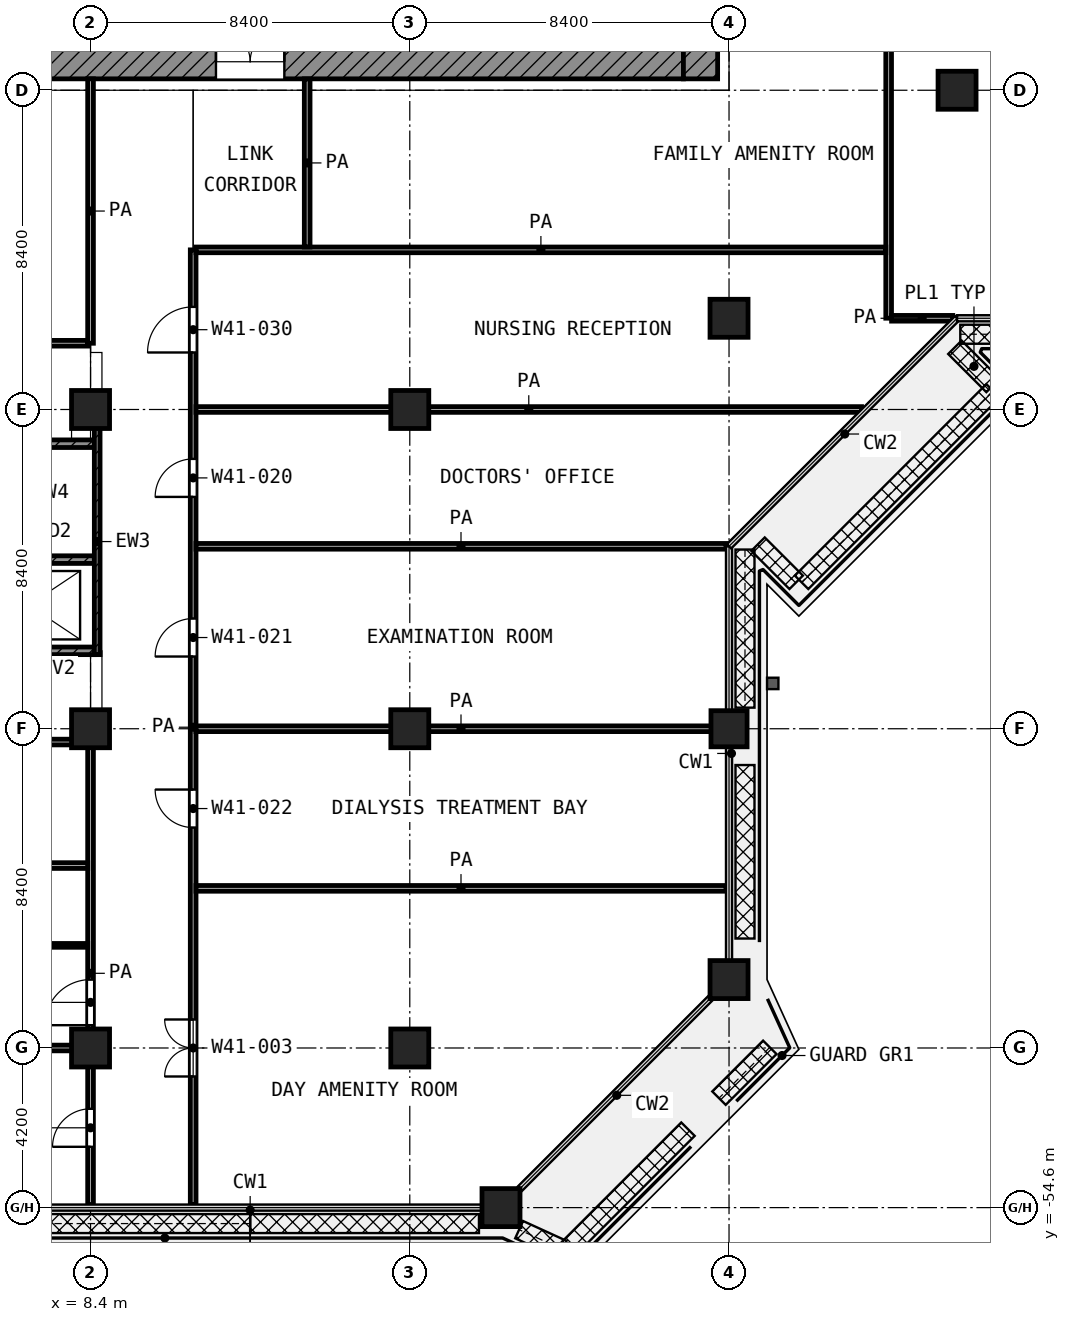
"""IFC4 building model, lengths in metres.
Left out: names, types, materials, properties, quantities, classifications, styles, units other than length and angle.
Written with IfcOpenShell. Run it as: python <this file> out.ifc"""

import sys

from ifc_helpers import new_model, si_unit, direction, frame, frame_2d, origin, origin_2d, place, context, subcontext, project, spatial, rectangle, extrude, element, fill, save


model = new_model("IFC4")
c1 = context("Model", 3, precision=1e-05, world=origin(), true_north=direction((0.0, 1.0)))
c2 = subcontext(c1, "Body", "Model", "MODEL_VIEW")
j1 = project(units=[si_unit("LENGTHUNIT", "METRE"), si_unit("PLANEANGLEUNIT", "RADIAN")], contexts=[c1])
p1 = place(None, origin())
s1 = spatial("IfcSite", under=j1, at=p1, CompositionType="ELEMENT")
p2 = place(p1, origin())
s2 = spatial("IfcBuilding", under=s1, at=p2, CompositionType="ELEMENT")
p3 = place(p2, frame((0.0, 0.0, 179.4)))
s3 = spatial("IfcBuildingStorey", under=s2, at=p3, CompositionType="ELEMENT", Elevation=179.4)
for number, where, z_axis, x_axis in (
    (1, (31.2, -25.2, 0.0), (0.0, 0.0, 1.0), (1.0, 0.0, 0.0)),
    (2, (25.2, -31.2, 0.0), (0.0, 0.0, 1.0), (1.0, 0.0, 0.0)),
    (3, (8.4, -33.6, 0.0), (0.0, 0.0, 1.0), (1.0, 0.0, 0.0)),
    (4, (16.8, -33.6, 0.0), (0.0, 0.0, 1.0), (1.0, 0.0, 0.0)),
    (5, (8.4, -42.0, 0.0), (0.0, 0.0, 1.0), (1.0, 0.0, 0.0)),
    (6, (16.8, -42.0, 0.0), (0.0, 0.0, 1.0), (1.0, 0.0, 0.0)),
):
    element("IfcColumn", number, at=place(p3, frame(where, z_axis=z_axis, x_axis=x_axis)), inside=s3, PredefinedType="COLUMN", context=c2, shape_type="SweptSolid", body=[
        extrude(rectangle(XDim=1.0, YDim=1.0, at=origin_2d()), origin(), (0.0, 0.0, 1.0), 4.2),
    ])
p4 = place(p3, frame((25.2, -42.0, 0.0), z_axis=(0.0, 0.0, 1.0), x_axis=(1.0, 0.0, 0.0)))
e7 = element("IfcColumn", 7, at=p4, inside=s3, PredefinedType="COLUMN", context=c2, shape_type="SweptSolid", body=[
    extrude(rectangle(XDim=0.95, YDim=0.95, at=origin_2d()), origin(), (0.0, 0.0, 1.0), 4.2),
])
for number, where, z_axis, x_axis in (
    (8, (25.2, -48.6, 0.0), (0.0, 0.0, 1.0), (1.0, 0.0, 0.0)),
    (9, (8.4, -50.4, 0.0), (0.0, 0.0, 1.0), (1.0, 0.0, 0.0)),
    (10, (16.8, -50.4, 0.0), (0.0, 0.0, 1.0), (1.0, 0.0, 0.0)),
    (11, (19.2, -54.6, 0.0), (0.0, 0.0, 1.0), (1.0, 0.0, 0.0)),
):
    element("IfcColumn", number, at=place(p3, frame(where, z_axis=z_axis, x_axis=x_axis)), inside=s3, PredefinedType="COLUMN", context=c2, shape_type="SweptSolid", body=[
        extrude(rectangle(XDim=1.0, YDim=1.0, at=origin_2d()), origin(), (0.0, 0.0, 1.0), 4.2),
    ])
p5 = place(p3, frame((5.4, -24.45, 0.0), z_axis=(0.0, 0.0, 1.0), x_axis=(1.0, 0.0, 0.0)))
e12 = element("IfcWall", 12, at=p5, inside=s3, PredefinedType="SHEAR", context=c2, shape_type="SweptSolid", body=[
    extrude(rectangle(XDim=18.6, YDim=0.9, at=frame_2d((9.3, 0.0))), origin(), (0.0, 0.0, 1.0), 3.6),
])
p6 = place(p5, frame((6.3, 0.0, 0.0)))
e13 = element("IfcOpeningElement", 13, at=p6, cuts=e12, PredefinedType="OPENING", context=c2, shape_type="SweptSolid", body=[
    extrude(rectangle(XDim=1.8, YDim=2.1, at=frame_2d((0.9, 1.05))), frame((0.0, 0.46, 0.0), z_axis=(0.0, -1.0, 0.0), x_axis=(1.0, 0.0, 0.0)), (0.0, 0.0, 1.0), 0.92),
])
p7 = place(p3, frame((24.45, -24.9, 0.0), z_axis=(0.0, 0.0, 1.0), x_axis=(0.0, 1.0, 0.0)))
e14 = element("IfcWall", 14, at=p7, inside=s3, PredefinedType="SHEAR", context=c2, shape_type="SweptSolid", body=[
    extrude(rectangle(XDim=0.9, YDim=0.9, at=frame_2d((0.45, 0.0))), origin(), (0.0, 0.0, 1.0), 3.6),
])
p8 = place(p3, frame((8.575, -40.05, 0.0), z_axis=(0.0, 0.0, 1.0), x_axis=(0.0, 1.0, 0.0)))
e15 = element("IfcWall", 15, at=p8, inside=s3, PredefinedType="SHEAR", context=c2, shape_type="SweptSolid", body=[
    extrude(rectangle(XDim=5.95, YDim=0.15, at=frame_2d((2.975, 0.0))), origin(), (0.0, 0.0, 1.0), 3.6),
])
p9 = place(p3, frame((0.45, -34.5, 0.0), z_axis=(0.0, 0.0, 1.0), x_axis=(1.0, 0.0, 0.0)))
e16 = element("IfcWall", 16, at=p9, inside=s3, PredefinedType="SHEAR", context=c2, shape_type="SweptSolid", body=[
    extrude(rectangle(XDim=8.05, YDim=0.2, at=frame_2d((4.025, 0.0))), origin(), (0.0, 0.0, 1.0), 3.6),
])
p10 = place(p9, frame((0.75, 0.0, 0.0)))
e17 = element("IfcOpeningElement", 17, at=p10, cuts=e16, PredefinedType="OPENING", context=c2, shape_type="SweptSolid", body=[
    extrude(rectangle(XDim=1.1, YDim=2.1, at=frame_2d((0.55, 1.05))), frame((0.0, 0.11, 0.0), z_axis=(0.0, -1.0, 0.0), x_axis=(1.0, 0.0, 0.0)), (0.0, 0.0, 1.0), 0.22),
])
p11 = place(p3, frame((0.45, -37.55, 0.0), z_axis=(0.0, 0.0, 1.0), x_axis=(1.0, 0.0, 0.0)))
e18 = element("IfcWall", 18, at=p11, inside=s3, PredefinedType="SHEAR", context=c2, shape_type="SweptSolid", body=[
    extrude(rectangle(XDim=8.05, YDim=0.2, at=frame_2d((4.025, 0.0))), origin(), (0.0, 0.0, 1.0), 3.6),
])
p12 = place(p11, frame((0.1, 0.0, 0.0)))
e19 = element("IfcOpeningElement", 19, at=p12, cuts=e18, PredefinedType="OPENING", context=c2, shape_type="SweptSolid", body=[
    extrude(rectangle(XDim=1.1, YDim=2.1, at=frame_2d((0.55, 1.05))), frame((0.0, 0.11, 0.0), z_axis=(0.0, -1.0, 0.0), x_axis=(1.0, 0.0, 0.0)), (0.0, 0.0, 1.0), 0.22),
])
p13 = place(p3, frame((0.45, -39.95, 0.0), z_axis=(0.0, 0.0, 1.0), x_axis=(1.0, 0.0, 0.0)))
e20 = element("IfcWall", 20, at=p13, inside=s3, PredefinedType="SHEAR", context=c2, shape_type="SweptSolid", body=[
    extrude(rectangle(XDim=8.05, YDim=0.2, at=frame_2d((4.025, 0.0))), origin(), (0.0, 0.0, 1.0), 3.6),
])
p14 = place(p13, frame((2.0, 0.0, 0.0)))
e21 = element("IfcOpeningElement", 21, at=p14, cuts=e20, PredefinedType="OPENING", context=c2, shape_type="SweptSolid", body=[
    extrude(rectangle(XDim=1.1, YDim=2.1, at=frame_2d((0.55, 1.05))), frame((0.0, 0.11, 0.0), z_axis=(0.0, -1.0, 0.0), x_axis=(1.0, 0.0, 0.0)), (0.0, 0.0, 1.0), 0.22),
])
p15 = place(p3, frame((5.75, -47.7, 0.0), z_axis=(0.0, 0.0, 1.0), x_axis=(1.0, 0.0, 0.0)))
e22 = element("IfcWall", 22, at=p15, inside=s3, PredefinedType="PARTITIONING", context=c2, shape_type="SweptSolid", body=[
    extrude(rectangle(XDim=2.575, YDim=0.1, at=frame_2d((1.288, 0.0))), origin(), (0.0, 0.0, 1.0), 3.6),
])
p16 = place(p3, frame((1.913, -50.4, 0.0), z_axis=(0.0, 0.0, 1.0), x_axis=(1.0, 0.0, 0.0)))
e23 = element("IfcWall", 23, at=p16, inside=s3, PredefinedType="PARTITIONING", context=c2, shape_type="SweptSolid", body=[
    extrude(rectangle(XDim=6.412, YDim=0.15, at=frame_2d((3.206, 0.0))), origin(), (0.0, 0.0, 1.0), 3.6),
])
p17 = place(p3, frame((11.175, -46.2, 0.0), z_axis=(0.0, 0.0, 1.0), x_axis=(1.0, 0.0, 0.0)))
e24 = element("IfcWall", 24, at=p17, inside=s3, PredefinedType="PARTITIONING", context=c2, shape_type="SweptSolid", body=[
    extrude(rectangle(XDim=13.945, YDim=0.15, at=frame_2d((6.973, 0.0))), origin(), (0.0, 0.0, 1.0), 3.6),
])
p18 = place(p3, frame((0.08, -45.6, 0.0), z_axis=(0.0, 0.0, 1.0), x_axis=(1.0, 0.0, 0.0)))
e25 = element("IfcWall", 25, at=p18, inside=s3, PredefinedType="PARTITIONING", context=c2, shape_type="SweptSolid", body=[
    extrude(rectangle(XDim=8.245, YDim=0.15, at=frame_2d((4.123, 0.0))), origin(), (0.0, 0.0, 1.0), 3.6),
])
p19 = place(p3, frame((2.327, -42.35, 0.0), z_axis=(0.0, 0.0, 1.0), x_axis=(1.0, 0.0, 0.0)))
e26 = element("IfcWall", 26, at=p19, inside=s3, PredefinedType="PARTITIONING", context=c2, shape_type="SweptSolid", body=[
    extrude(rectangle(XDim=5.998, YDim=0.15, at=frame_2d((2.999, 0.0))), origin(), (0.0, 0.0, 1.0), 3.6),
])
p20 = place(p19, frame((2.499, 0.0, 0.0)))
e27 = element("IfcOpeningElement", 27, at=p20, cuts=e26, PredefinedType="OPENING", context=c2, shape_type="SweptSolid", body=[
    extrude(rectangle(XDim=1.0, YDim=2.1, at=frame_2d((0.5, 1.05))), frame((0.0, 0.085, 0.0), z_axis=(0.0, -1.0, 0.0), x_axis=(1.0, 0.0, 0.0)), (0.0, 0.0, 1.0), 0.17),
])
for number, where, z_axis, x_axis in (
    (28, (11.175, -42.0, 0.0), (0.0, 0.0, 1.0), (1.0, 0.0, 0.0)),
    (29, (11.175, -37.2, 0.0), (0.0, 0.0, 1.0), (1.0, 0.0, 0.0)),
):
    element("IfcWall", number, at=place(p3, frame(where, z_axis=z_axis, x_axis=x_axis)), inside=s3, PredefinedType="PARTITIONING", context=c2, shape_type="SweptSolid", body=[
        extrude(rectangle(XDim=13.945, YDim=0.15, at=frame_2d((6.973, 0.0))), origin(), (0.0, 0.0, 1.0), 3.6),
    ])
p21 = place(p3, frame((11.175, -33.6, 0.0), z_axis=(0.0, 0.0, 1.0), x_axis=(1.0, 0.0, 0.0)))
e30 = element("IfcWall", 30, at=p21, inside=s3, PredefinedType="PARTITIONING", context=c2, shape_type="SweptSolid", body=[
    extrude(rectangle(XDim=17.512, YDim=0.15, at=frame_2d((8.756, 0.0))), origin(), (0.0, 0.0, 1.0), 3.6),
])
p22 = place(p3, frame((1.077, -31.857, 0.0), z_axis=(0.0, 0.0, 1.0), x_axis=(1.0, 0.0, 0.0)))
e31 = element("IfcWall", 31, at=p22, inside=s3, PredefinedType="PARTITIONING", context=c2, shape_type="SweptSolid", body=[
    extrude(rectangle(XDim=7.248, YDim=0.15, at=frame_2d((3.624, 0.0))), origin(), (0.0, 0.0, 1.0), 3.6),
])
p23 = place(p22, frame((3.024, 0.0, 0.0)))
e32 = element("IfcOpeningElement", 32, at=p23, cuts=e31, PredefinedType="OPENING", context=c2, shape_type="SweptSolid", body=[
    extrude(rectangle(XDim=1.2, YDim=2.1, at=frame_2d((0.6, 1.05))), frame((0.0, 0.085, 0.0), z_axis=(0.0, -1.0, 0.0), x_axis=(1.0, 0.0, 0.0)), (0.0, 0.0, 1.0), 0.17),
])
p24 = place(p3, frame((29.477, -31.2, 0.0), z_axis=(0.0, 0.0, 1.0), x_axis=(1.0, 0.0, 0.0)))
e33 = element("IfcWall", 33, at=p24, inside=s3, PredefinedType="PARTITIONING", context=c2, shape_type="SweptSolid", body=[
    extrude(rectangle(XDim=1.61, YDim=0.15, at=frame_2d((0.805, 0.0))), origin(), (0.0, 0.0, 1.0), 3.6),
])
p25 = place(p3, frame((11.175, -29.4, 0.0), z_axis=(0.0, 0.0, 1.0), x_axis=(1.0, 0.0, 0.0)))
e34 = element("IfcWall", 34, at=p25, inside=s3, PredefinedType="PARTITIONING", context=c2, shape_type="SweptSolid", body=[
    extrude(rectangle(XDim=18.15, YDim=0.15, at=frame_2d((9.075, 0.0))), origin(), (0.0, 0.0, 1.0), 3.6),
])
p26 = place(p3, frame((8.4, -54.52, 0.0), z_axis=(0.0, 0.0, 1.0), x_axis=(0.0, 1.0, 0.0)))
e35 = element("IfcWall", 35, at=p26, inside=s3, PredefinedType="PARTITIONING", context=c2, shape_type="SweptSolid", body=[
    extrude(rectangle(XDim=12.17, YDim=0.15, at=frame_2d((6.085, 0.0))), origin(), (0.0, 0.0, 1.0), 3.6),
])
p27 = place(p26, frame((4.72, 0.0, 0.0)))
e36 = element("IfcOpeningElement", 36, at=p27, cuts=e35, PredefinedType="OPENING", context=c2, shape_type="SweptSolid", body=[
    extrude(rectangle(XDim=1.2, YDim=2.1, at=frame_2d((0.6, 1.05))), frame((0.0, 0.085, 0.0), z_axis=(0.0, -1.0, 0.0), x_axis=(1.0, 0.0, 0.0)), (0.0, 0.0, 1.0), 0.17),
])
p28 = place(p26, frame((1.52, 0.0, 0.0)))
e37 = element("IfcOpeningElement", 37, at=p28, cuts=e35, PredefinedType="OPENING", context=c2, shape_type="SweptSolid", body=[
    extrude(rectangle(XDim=1.0, YDim=2.1, at=frame_2d((0.5, 1.05))), frame((0.0, 0.085, 0.0), z_axis=(0.0, -1.0, 0.0), x_axis=(1.0, 0.0, 0.0)), (0.0, 0.0, 1.0), 0.17),
])
p29 = place(p3, frame((8.4, -31.857, 0.0), z_axis=(0.0, 0.0, 1.0), x_axis=(0.0, 1.0, 0.0)))
e38 = element("IfcWall", 38, at=p29, inside=s3, PredefinedType="PARTITIONING", context=c2, shape_type="SweptSolid", body=[
    extrude(rectangle(XDim=6.957, YDim=0.15, at=frame_2d((3.479, 0.0))), origin(), (0.0, 0.0, 1.0), 3.6),
])
p30 = place(p3, frame((11.1, -54.52, 0.0), z_axis=(0.0, 0.0, 1.0), x_axis=(0.0, 1.0, 0.0)))
e39 = element("IfcWall", 39, at=p30, inside=s3, PredefinedType="PARTITIONING", context=c2, shape_type="SweptSolid", body=[
    extrude(rectangle(XDim=25.12, YDim=0.15, at=frame_2d((12.56, 0.0))), origin(), (0.0, 0.0, 1.0), 3.6),
])
p31 = place(p30, frame((22.42, 0.0, 0.0)))
e40 = element("IfcOpeningElement", 40, at=p31, cuts=e39, PredefinedType="OPENING", context=c2, shape_type="SweptSolid", body=[
    extrude(rectangle(XDim=1.2, YDim=2.1, at=frame_2d((0.6, 1.05))), frame((0.0, 0.085, 0.0), z_axis=(0.0, -1.0, 0.0), x_axis=(1.0, 0.0, 0.0)), (0.0, 0.0, 1.0), 0.17),
])
p32 = place(p30, frame((18.62, 0.0, 0.0)))
e41 = element("IfcOpeningElement", 41, at=p32, cuts=e39, PredefinedType="OPENING", context=c2, shape_type="SweptSolid", body=[
    extrude(rectangle(XDim=1.0, YDim=2.1, at=frame_2d((0.5, 1.05))), frame((0.0, 0.085, 0.0), z_axis=(0.0, -1.0, 0.0), x_axis=(1.0, 0.0, 0.0)), (0.0, 0.0, 1.0), 0.17),
])
p33 = place(p30, frame((14.42, 0.0, 0.0)))
e42 = element("IfcOpeningElement", 42, at=p33, cuts=e39, PredefinedType="OPENING", context=c2, shape_type="SweptSolid", body=[
    extrude(rectangle(XDim=1.0, YDim=2.1, at=frame_2d((0.5, 1.05))), frame((0.0, 0.085, 0.0), z_axis=(0.0, -1.0, 0.0), x_axis=(1.0, 0.0, 0.0)), (0.0, 0.0, 1.0), 0.17),
])
p34 = place(p30, frame((9.92, 0.0, 0.0)))
e43 = element("IfcOpeningElement", 43, at=p34, cuts=e39, PredefinedType="OPENING", context=c2, shape_type="SweptSolid", body=[
    extrude(rectangle(XDim=1.0, YDim=2.1, at=frame_2d((0.5, 1.05))), frame((0.0, 0.085, 0.0), z_axis=(0.0, -1.0, 0.0), x_axis=(1.0, 0.0, 0.0)), (0.0, 0.0, 1.0), 0.17),
])
p35 = place(p30, frame((3.37, 0.0, 0.0)))
e44 = element("IfcOpeningElement", 44, at=p35, cuts=e39, PredefinedType="OPENING", context=c2, shape_type="SweptSolid", body=[
    extrude(rectangle(XDim=1.5, YDim=2.1, at=frame_2d((0.75, 1.05))), frame((0.0, 0.085, 0.0), z_axis=(0.0, -1.0, 0.0), x_axis=(1.0, 0.0, 0.0)), (0.0, 0.0, 1.0), 0.17),
])
p36 = place(p3, frame((14.1, -29.325, 0.0), z_axis=(0.0, 0.0, 1.0), x_axis=(0.0, 1.0, 0.0)))
e45 = element("IfcWall", 45, at=p36, inside=s3, PredefinedType="PARTITIONING", context=c2, shape_type="SweptSolid", body=[
    extrude(rectangle(XDim=4.425, YDim=0.15, at=frame_2d((2.212, 0.0))), origin(), (0.0, 0.0, 1.0), 3.6),
])
p37 = place(p3, frame((29.4, -31.198, 0.0), z_axis=(0.0, 0.0, 1.0), x_axis=(0.0, 1.0, 0.0)))
e46 = element("IfcWall", 46, at=p37, inside=s3, PredefinedType="PARTITIONING", context=c2, shape_type="SweptSolid", body=[
    extrude(rectangle(XDim=20.098, YDim=0.15, at=frame_2d((10.049, 0.0))), origin(), (0.0, 0.0, 1.0), 3.6),
])
p38 = place(p6, origin())
e47 = element("IfcDoor", 47, at=p38, inside=s3, OperationType="DOUBLE_DOOR_SINGLE_SWING", PredefinedType="DOOR", context=c2, shape_type="SweptSolid", body=[
    extrude(rectangle(XDim=1.8, YDim=2.1, at=frame_2d((0.9, 1.05))), frame((0.0, 0.025, 0.0), z_axis=(0.0, -1.0, 0.0), x_axis=(1.0, 0.0, 0.0)), (0.0, 0.0, 1.0), 0.05),
])
fill(e13, e47)
p39 = place(p27, origin())
e48 = element("IfcDoor", 48, at=p39, inside=s3, OperationType="SINGLE_SWING_LEFT", PredefinedType="DOOR", context=c2, shape_type="SweptSolid", body=[
    extrude(rectangle(XDim=1.2, YDim=2.1, at=frame_2d((0.6, 1.05))), frame((0.0, 0.025, 0.0), z_axis=(0.0, -1.0, 0.0), x_axis=(1.0, 0.0, 0.0)), (0.0, 0.0, 1.0), 0.05),
])
fill(e36, e48)
p40 = place(p28, origin())
e49 = element("IfcDoor", 49, at=p40, inside=s3, OperationType="SINGLE_SWING_LEFT", PredefinedType="DOOR", context=c2, shape_type="SweptSolid", body=[
    extrude(rectangle(XDim=1.0, YDim=2.1, at=frame_2d((0.5, 1.05))), frame((0.0, 0.025, 0.0), z_axis=(0.0, -1.0, 0.0), x_axis=(1.0, 0.0, 0.0)), (0.0, 0.0, 1.0), 0.05),
])
fill(e37, e49)
p41 = place(p31, origin())
e50 = element("IfcDoor", 50, at=p41, inside=s3, OperationType="SINGLE_SWING_LEFT", PredefinedType="DOOR", context=c2, shape_type="SweptSolid", body=[
    extrude(rectangle(XDim=1.2, YDim=2.1, at=frame_2d((0.6, 1.05))), frame((0.0, 0.025, 0.0), z_axis=(0.0, -1.0, 0.0), x_axis=(1.0, 0.0, 0.0)), (0.0, 0.0, 1.0), 0.05),
])
fill(e40, e50)
p42 = place(p32, origin())
e51 = element("IfcDoor", 51, at=p42, inside=s3, OperationType="SINGLE_SWING_LEFT", PredefinedType="DOOR", context=c2, shape_type="SweptSolid", body=[
    extrude(rectangle(XDim=1.0, YDim=2.1, at=frame_2d((0.5, 1.05))), frame((0.0, 0.025, 0.0), z_axis=(0.0, -1.0, 0.0), x_axis=(1.0, 0.0, 0.0)), (0.0, 0.0, 1.0), 0.05),
])
fill(e41, e51)
p43 = place(p33, origin())
e52 = element("IfcDoor", 52, at=p43, inside=s3, OperationType="SINGLE_SWING_LEFT", PredefinedType="DOOR", context=c2, shape_type="SweptSolid", body=[
    extrude(rectangle(XDim=1.0, YDim=2.1, at=frame_2d((0.5, 1.05))), frame((0.0, 0.025, 0.0), z_axis=(0.0, -1.0, 0.0), x_axis=(1.0, 0.0, 0.0)), (0.0, 0.0, 1.0), 0.05),
])
fill(e42, e52)
p44 = place(p34, origin())
e53 = element("IfcDoor", 53, at=p44, inside=s3, OperationType="SINGLE_SWING_RIGHT", PredefinedType="DOOR", context=c2, shape_type="SweptSolid", body=[
    extrude(rectangle(XDim=1.0, YDim=2.1, at=frame_2d((0.5, 1.05))), frame((0.0, 0.025, 0.0), z_axis=(0.0, -1.0, 0.0), x_axis=(1.0, 0.0, 0.0)), (0.0, 0.0, 1.0), 0.05),
])
fill(e43, e53)
p45 = place(p35, origin())
e54 = element("IfcDoor", 54, at=p45, inside=s3, OperationType="DOUBLE_DOOR_SINGLE_SWING", PredefinedType="DOOR", context=c2, shape_type="SweptSolid", body=[
    extrude(rectangle(XDim=1.5, YDim=2.1, at=frame_2d((0.75, 1.05))), frame((0.0, 0.025, 0.0), z_axis=(0.0, -1.0, 0.0), x_axis=(1.0, 0.0, 0.0)), (0.0, 0.0, 1.0), 0.05),
])
fill(e44, e54)
save(model, sys.argv[1])
